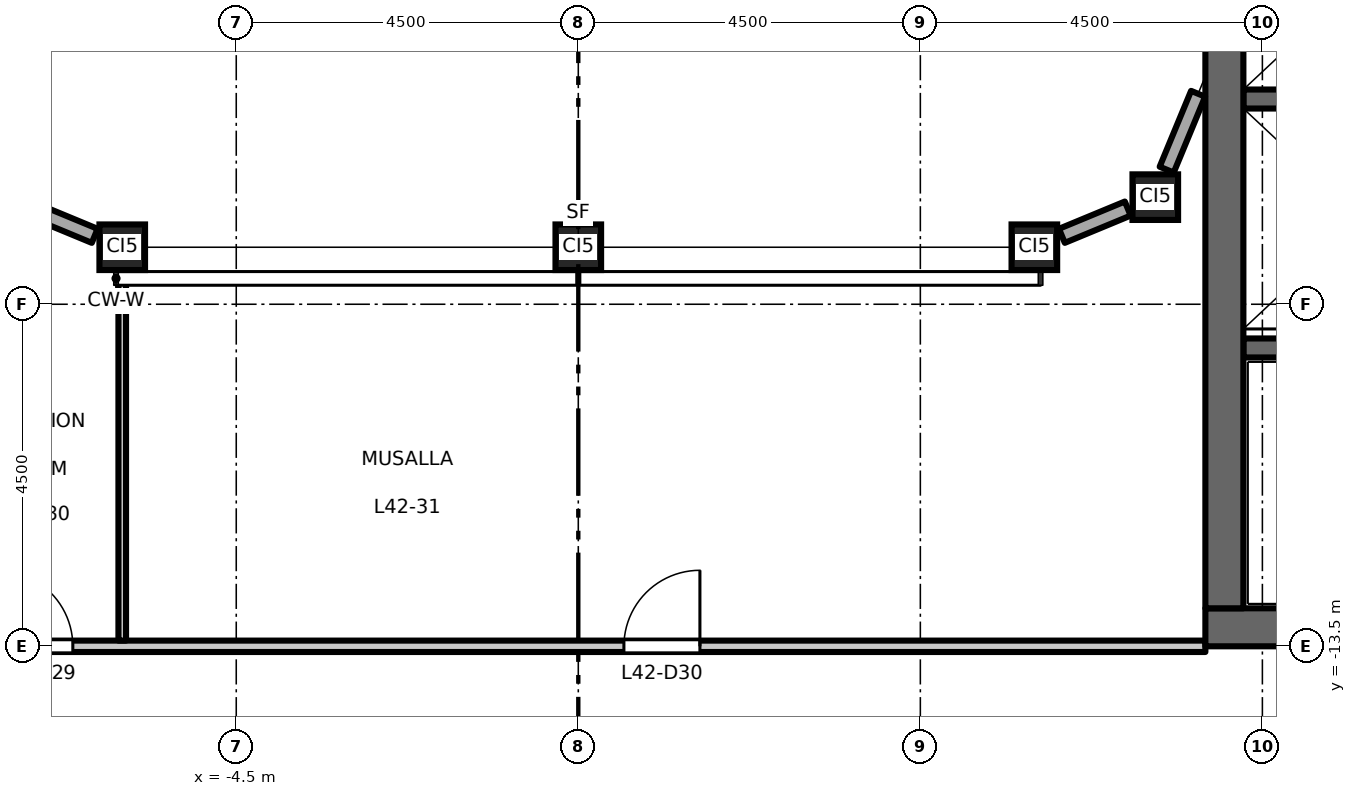
"""IFC4 building model, lengths in metres.
Left out: names, types, materials, properties, quantities, classifications, styles, units other than length and angle.
Written with IfcOpenShell. Run it as: python <this file> out.ifc"""

import sys

from ifc_helpers import new_model, si_unit, direction, frame, frame_2d, origin, origin_2d, place, context, subcontext, project, spatial, rectangle, hollow_rectangle, extrude, element, fill, save


model = new_model("IFC4")
c1 = context("Model", 3, precision=1e-05, world=origin(), true_north=direction((0.0, 1.0)))
c2 = subcontext(c1, "Body", "Model", "MODEL_VIEW")
j1 = project(units=[si_unit("LENGTHUNIT", "METRE"), si_unit("PLANEANGLEUNIT", "RADIAN")], contexts=[c1])
p1 = place(None, origin())
s1 = spatial("IfcSite", under=j1, at=p1, CompositionType="ELEMENT")
p2 = place(p1, origin())
s2 = spatial("IfcBuilding", under=s1, at=p2, CompositionType="ELEMENT")
p3 = place(p2, frame((0.0, 0.0, 197.2)))
s3 = spatial("IfcBuildingStorey", under=s2, at=p3, CompositionType="ELEMENT", Elevation=197.2)
for number, where, z_axis, x_axis in (
    (1, (-6.0, -8.25, 0.0), (0.0, 0.0, 1.0), (1.0, 0.0, 0.0)),
    (2, (0.0, -8.25, 0.0), (0.0, 0.0, 1.0), (1.0, 0.0, 0.0)),
    (3, (6.0, -8.25, 0.0), (0.0, 0.0, 1.0), (1.0, 0.0, 0.0)),
    (4, (7.591, -7.591, 0.0), (0.0, 0.0, 1.0), (1.0, 0.0, 0.0)),
):
    element("IfcColumn", number, at=place(p3, frame(where, z_axis=z_axis, x_axis=x_axis)), inside=s3, PredefinedType="COLUMN", context=c2, shape_type="SweptSolid", body=[
        extrude(hollow_rectangle(XDim=0.6, YDim=0.6, WallThickness=0.032, at=origin_2d()), origin(), (0.0, 0.0, 1.0), 4.5),
    ])
p4 = place(p3, frame((8.75, -6.3, 0.0), z_axis=(0.0, 0.0, 1.0), x_axis=(1.0, 0.0, 0.0)))
e5 = element("IfcWall", 5, at=p4, inside=s3, PredefinedType="SHEAR", context=c2, shape_type="SweptSolid", body=[
    extrude(rectangle(XDim=3.1, YDim=0.25, at=frame_2d((1.55, 0.0))), origin(), (0.0, 0.0, 1.0), 4.35),
])
p5 = place(p3, frame((8.75, -9.575, 0.0), z_axis=(0.0, 0.0, 1.0), x_axis=(1.0, 0.0, 0.0)))
e6 = element("IfcWall", 6, at=p5, inside=s3, PredefinedType="SHEAR", context=c2, shape_type="SweptSolid", body=[
    extrude(rectangle(XDim=8.0, YDim=0.25, at=frame_2d((4.0, 0.0))), origin(), (0.0, 0.0, 1.0), 4.35),
])
p6 = place(p5, frame((6.65, 0.0, 0.0)))
e7 = element("IfcOpeningElement", 7, at=p6, cuts=e6, PredefinedType="OPENING", context=c2, shape_type="SweptSolid", body=[
    extrude(rectangle(XDim=1.1, YDim=2.1, at=frame_2d((0.55, 1.05))), frame((0.0, 0.135, 0.0), z_axis=(0.0, -1.0, 0.0), x_axis=(1.0, 0.0, 0.0)), (0.0, 0.0, 1.0), 0.27),
])
p7 = place(p3, frame((8.25, -13.25, 0.0), z_axis=(0.0, 0.0, 1.0), x_axis=(1.0, 0.0, 0.0)))
e8 = element("IfcWall", 8, at=p7, inside=s3, PredefinedType="SHEAR", context=c2, shape_type="SweptSolid", body=[
    extrude(rectangle(XDim=13.5, YDim=0.5, at=frame_2d((6.75, 0.0))), origin(), (0.0, 0.0, 1.0), 4.35),
])
p8 = place(p3, frame((8.5, -13.0, 0.0), z_axis=(0.0, 0.0, 1.0), x_axis=(0.0, 1.0, 0.0)))
e9 = element("IfcWall", 9, at=p8, inside=s3, PredefinedType="SHEAR", context=c2, shape_type="SweptSolid", body=[
    extrude(rectangle(XDim=26.0, YDim=0.5, at=frame_2d((13.0, 0.0))), origin(), (0.0, 0.0, 1.0), 4.35),
])
p9 = place(p3, frame((6.362, -8.1, 0.0), z_axis=(0.0, 0.0, 1.0), x_axis=(0.923829670615, 0.382803787458, 0.0)))
e10 = element("IfcWall", 10, at=p9, inside=s3, PredefinedType="STANDARD", context=c2, shape_type="SweptSolid", body=[
    extrude(rectangle(XDim=0.938, YDim=0.2, at=frame_2d((0.469, 0.0))), origin(), (0.0, 0.0, 1.0), 3.918),
])
p10 = place(p3, frame((7.741, -7.229, 0.0), z_axis=(0.0, 0.0, 1.0), x_axis=(0.382704496366, 0.923870807235, 0.0)))
e11 = element("IfcWall", 11, at=p10, inside=s3, PredefinedType="STANDARD", context=c2, shape_type="SweptSolid", body=[
    extrude(rectangle(XDim=1.08, YDim=0.2, at=frame_2d((0.54, 0.0))), origin(), (0.0, 0.0, 1.0), 3.918),
])
p11 = place(p3, frame((-7.229, -7.741, 0.0), z_axis=(0.0, 0.0, 1.0), x_axis=(0.923829670615, -0.382803787458, 0.0)))
e12 = element("IfcWall", 12, at=p11, inside=s3, PredefinedType="STANDARD", context=c2, shape_type="SweptSolid", body=[
    extrude(rectangle(XDim=0.938, YDim=0.2, at=frame_2d((0.469, 0.0))), origin(), (0.0, 0.0, 1.0), 3.918),
])
p12 = place(p3, frame((-8.25, -13.5, 0.0), z_axis=(0.0, 0.0, 1.0), x_axis=(1.0, 0.0, 0.0)))
e13 = element("IfcWall", 13, at=p12, inside=s3, PredefinedType="PARTITIONING", context=c2, shape_type="SweptSolid", body=[
    extrude(rectangle(XDim=16.5, YDim=0.15, at=frame_2d((8.25, 0.0))), origin(), (0.0, 0.0, 1.0), 3.95),
])
p13 = place(p12, frame((0.6, 0.0, 0.0)))
e14 = element("IfcOpeningElement", 14, at=p13, cuts=e13, PredefinedType="OPENING", context=c2, shape_type="SweptSolid", body=[
    extrude(rectangle(XDim=1.0, YDim=2.1, at=frame_2d((0.5, 1.05))), frame((0.0, 0.085, 0.0), z_axis=(0.0, -1.0, 0.0), x_axis=(1.0, 0.0, 0.0)), (0.0, 0.0, 1.0), 0.17),
])
p14 = place(p12, frame((8.85, 0.0, 0.0)))
e15 = element("IfcOpeningElement", 15, at=p14, cuts=e13, PredefinedType="OPENING", context=c2, shape_type="SweptSolid", body=[
    extrude(rectangle(XDim=1.0, YDim=2.1, at=frame_2d((0.5, 1.05))), frame((0.0, 0.085, 0.0), z_axis=(0.0, -1.0, 0.0), x_axis=(1.0, 0.0, 0.0)), (0.0, 0.0, 1.0), 0.17),
])
p15 = place(p3, frame((-6.0, -13.425, 0.0), z_axis=(0.0, 0.0, 1.0), x_axis=(0.0, 1.0, 0.0)))
e16 = element("IfcWall", 16, at=p15, inside=s3, PredefinedType="PARTITIONING", context=c2, shape_type="SweptSolid", body=[
    extrude(rectangle(XDim=4.825, YDim=0.1, at=frame_2d((2.413, 0.0))), origin(), (0.0, 0.0, 1.0), 4.35),
])
p16 = place(p13, origin())
e17 = element("IfcDoor", 17, at=p16, inside=s3, OperationType="SINGLE_SWING_LEFT", PredefinedType="DOOR", context=c2, shape_type="SweptSolid", body=[
    extrude(rectangle(XDim=1.0, YDim=2.1, at=frame_2d((0.5, 1.05))), frame((0.0, 0.025, 0.0), z_axis=(0.0, -1.0, 0.0), x_axis=(1.0, 0.0, 0.0)), (0.0, 0.0, 1.0), 0.05),
])
fill(e14, e17)
p17 = place(p14, origin())
e18 = element("IfcDoor", 18, at=p17, inside=s3, OperationType="SINGLE_SWING_RIGHT", PredefinedType="DOOR", context=c2, shape_type="SweptSolid", body=[
    extrude(rectangle(XDim=1.0, YDim=2.1, at=frame_2d((0.5, 1.05))), frame((0.0, 0.025, 0.0), z_axis=(0.0, -1.0, 0.0), x_axis=(1.0, 0.0, 0.0)), (0.0, 0.0, 1.0), 0.05),
])
fill(e15, e18)
save(model, sys.argv[1])
